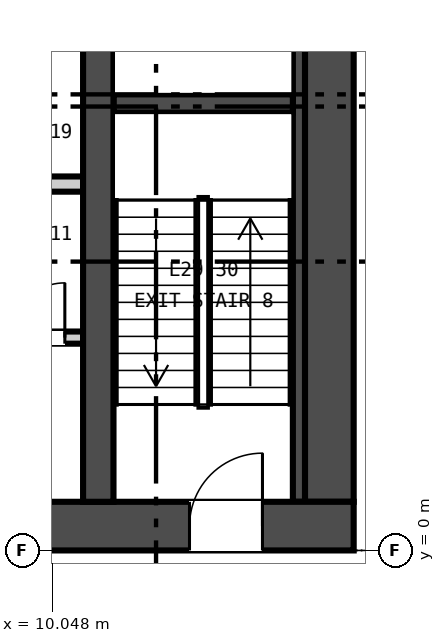
"""IFC4 building model, lengths in metres.
Left out: names, types, materials, properties, quantities, classifications, styles, units other than length and angle.
Written with IfcOpenShell. Run it as: python <this file> out.ifc"""

import sys

from ifc_helpers import new_model, si_unit, direction, frame, frame_2d, origin, place, context, subcontext, project, spatial, rectangle, extrude, element, fill, save


model = new_model("IFC4")
c1 = context("Model", 3, precision=1e-05, world=origin(), true_north=direction((0.0, 1.0)))
c2 = subcontext(c1, "Body", "Model", "MODEL_VIEW")
j1 = project(units=[si_unit("LENGTHUNIT", "METRE"), si_unit("PLANEANGLEUNIT", "RADIAN")], contexts=[c1])
p1 = place(None, origin())
s1 = spatial("IfcSite", under=j1, at=p1, CompositionType="ELEMENT")
p2 = place(p1, origin())
s2 = spatial("IfcBuilding", under=s1, at=p2, CompositionType="ELEMENT")
p3 = place(p2, frame((0.0, 0.0, 121.65)))
s3 = spatial("IfcBuildingStorey", under=s2, at=p3, CompositionType="ELEMENT", Elevation=121.65)
p4 = place(p3, frame((-15.0, 0.4, -0.3), z_axis=(0.0, 0.0, 1.0), x_axis=(1.0, 0.0, 0.0)))
e1 = element("IfcWall", 1, at=p4, inside=s3, PredefinedType="SOLIDWALL", context=c2, shape_type="SweptSolid", body=[
    extrude(rectangle(XDim=30.0, YDim=0.8, at=frame_2d((15.0, 0.0))), origin(), (0.0, 0.0, 1.0), 4.65),
])
p5 = place(p4, frame((5.8, 0.0, 0.3)))
e2 = element("IfcOpeningElement", 2, at=p5, cuts=e1, PredefinedType="OPENING", context=c2, shape_type="SweptSolid", body=[
    extrude(rectangle(XDim=2.4, YDim=2.4, at=frame_2d((1.2, 1.2))), frame((0.0, 0.41, 0.0), z_axis=(0.0, -1.0, 0.0), x_axis=(1.0, 0.0, 0.0)), (0.0, 0.0, 1.0), 0.82),
])
p6 = place(p4, frame((13.8, 0.0, 0.3)))
e3 = element("IfcOpeningElement", 3, at=p6, cuts=e1, PredefinedType="OPENING", context=c2, shape_type="SweptSolid", body=[
    extrude(rectangle(XDim=2.4, YDim=2.4, at=frame_2d((1.2, 1.2))), frame((0.0, 0.41, 0.0), z_axis=(0.0, -1.0, 0.0), x_axis=(1.0, 0.0, 0.0)), (0.0, 0.0, 1.0), 0.82),
])
p7 = place(p4, frame((21.8, 0.0, 0.3)))
e4 = element("IfcOpeningElement", 4, at=p7, cuts=e1, PredefinedType="OPENING", context=c2, shape_type="SweptSolid", body=[
    extrude(rectangle(XDim=2.4, YDim=2.4, at=frame_2d((1.2, 1.2))), frame((0.0, 0.41, 0.0), z_axis=(0.0, -1.0, 0.0), x_axis=(1.0, 0.0, 0.0)), (0.0, 0.0, 1.0), 0.82),
])
p8 = place(p4, frame((1.5, 0.0, 0.3)))
e5 = element("IfcOpeningElement", 5, at=p8, cuts=e1, PredefinedType="OPENING", context=c2, shape_type="SweptSolid", body=[
    extrude(rectangle(XDim=1.2, YDim=2.1, at=frame_2d((0.6, 1.05))), frame((0.0, 0.41, 0.0), z_axis=(0.0, -1.0, 0.0), x_axis=(1.0, 0.0, 0.0)), (0.0, 0.0, 1.0), 0.82),
])
p9 = place(p4, frame((27.3, 0.0, 0.3)))
e6 = element("IfcOpeningElement", 6, at=p9, cuts=e1, PredefinedType="OPENING", context=c2, shape_type="SweptSolid", body=[
    extrude(rectangle(XDim=1.2, YDim=2.1, at=frame_2d((0.6, 1.05))), frame((0.0, 0.41, 0.0), z_axis=(0.0, -1.0, 0.0), x_axis=(1.0, 0.0, 0.0)), (0.0, 0.0, 1.0), 0.82),
])
p10 = place(p3, frame((14.6, 0.8, -0.3), z_axis=(0.0, 0.0, 1.0), x_axis=(0.0, 1.0, 0.0)))
e7 = element("IfcWall", 7, at=p10, inside=s3, PredefinedType="SOLIDWALL", context=c2, shape_type="SweptSolid", body=[
    extrude(rectangle(XDim=13.4, YDim=0.8, at=frame_2d((6.7, 0.0))), origin(), (0.0, 0.0, 1.0), 4.65),
])
p11 = place(p3, frame((10.8, 0.8, -0.3), z_axis=(0.0, 0.0, 1.0), x_axis=(0.0, 1.0, 0.0)))
e8 = element("IfcWall", 8, at=p11, inside=s3, PredefinedType="SOLIDWALL", context=c2, shape_type="SweptSolid", body=[
    extrude(rectangle(XDim=13.4, YDim=0.5, at=frame_2d((6.7, 0.0))), origin(), (0.0, 0.0, 1.0), 4.65),
])
p12 = place(p3, frame((-10.55, 3.5, 0.0), z_axis=(0.0, 0.0, 1.0), x_axis=(1.0, 0.0, 0.0)))
e9 = element("IfcWall", 9, at=p12, inside=s3, PredefinedType="PARTITIONING", context=c2, shape_type="SweptSolid", body=[
    extrude(rectangle(XDim=21.1, YDim=0.2, at=frame_2d((10.55, 0.0))), origin(), (0.0, 0.0, 1.0), 4.35),
])
p13 = place(p12, frame((0.675, 0.0, 0.0)))
e10 = element("IfcOpeningElement", 10, at=p13, cuts=e9, PredefinedType="OPENING", context=c2, shape_type="SweptSolid", body=[
    extrude(rectangle(XDim=1.2, YDim=2.1, at=frame_2d((0.6, 1.05))), frame((0.0, 0.11, 0.0), z_axis=(0.0, -1.0, 0.0), x_axis=(1.0, 0.0, 0.0)), (0.0, 0.0, 1.0), 0.22),
])
p14 = place(p12, frame((3.475, 0.0, 0.0)))
e11 = element("IfcOpeningElement", 11, at=p14, cuts=e9, PredefinedType="OPENING", context=c2, shape_type="SweptSolid", body=[
    extrude(rectangle(XDim=1.2, YDim=2.1, at=frame_2d((0.6, 1.05))), frame((0.0, 0.11, 0.0), z_axis=(0.0, -1.0, 0.0), x_axis=(1.0, 0.0, 0.0)), (0.0, 0.0, 1.0), 0.22),
])
p15 = place(p12, frame((6.275, 0.0, 0.0)))
e12 = element("IfcOpeningElement", 12, at=p15, cuts=e9, PredefinedType="OPENING", context=c2, shape_type="SweptSolid", body=[
    extrude(rectangle(XDim=1.2, YDim=2.1, at=frame_2d((0.6, 1.05))), frame((0.0, 0.11, 0.0), z_axis=(0.0, -1.0, 0.0), x_axis=(1.0, 0.0, 0.0)), (0.0, 0.0, 1.0), 0.22),
])
p16 = place(p12, frame((9.075, 0.0, 0.0)))
e13 = element("IfcOpeningElement", 13, at=p16, cuts=e9, PredefinedType="OPENING", context=c2, shape_type="SweptSolid", body=[
    extrude(rectangle(XDim=1.2, YDim=2.1, at=frame_2d((0.6, 1.05))), frame((0.0, 0.11, 0.0), z_axis=(0.0, -1.0, 0.0), x_axis=(1.0, 0.0, 0.0)), (0.0, 0.0, 1.0), 0.22),
])
p17 = place(p12, frame((11.875, 0.0, 0.0)))
e14 = element("IfcOpeningElement", 14, at=p17, cuts=e9, PredefinedType="OPENING", context=c2, shape_type="SweptSolid", body=[
    extrude(rectangle(XDim=1.2, YDim=2.1, at=frame_2d((0.6, 1.05))), frame((0.0, 0.11, 0.0), z_axis=(0.0, -1.0, 0.0), x_axis=(1.0, 0.0, 0.0)), (0.0, 0.0, 1.0), 0.22),
])
p18 = place(p12, frame((14.675, 0.0, 0.0)))
e15 = element("IfcOpeningElement", 15, at=p18, cuts=e9, PredefinedType="OPENING", context=c2, shape_type="SweptSolid", body=[
    extrude(rectangle(XDim=1.2, YDim=2.1, at=frame_2d((0.6, 1.05))), frame((0.0, 0.11, 0.0), z_axis=(0.0, -1.0, 0.0), x_axis=(1.0, 0.0, 0.0)), (0.0, 0.0, 1.0), 0.22),
])
p19 = place(p12, frame((17.475, 0.0, 0.0)))
e16 = element("IfcOpeningElement", 16, at=p19, cuts=e9, PredefinedType="OPENING", context=c2, shape_type="SweptSolid", body=[
    extrude(rectangle(XDim=1.2, YDim=2.1, at=frame_2d((0.6, 1.05))), frame((0.0, 0.11, 0.0), z_axis=(0.0, -1.0, 0.0), x_axis=(1.0, 0.0, 0.0)), (0.0, 0.0, 1.0), 0.22),
])
p20 = place(p12, frame((19.9, 0.0, 0.0)))
e17 = element("IfcOpeningElement", 17, at=p20, cuts=e9, PredefinedType="OPENING", context=c2, shape_type="SweptSolid", body=[
    extrude(rectangle(XDim=0.9, YDim=2.1, at=frame_2d((0.45, 1.05))), frame((0.0, 0.11, 0.0), z_axis=(0.0, -1.0, 0.0), x_axis=(1.0, 0.0, 0.0)), (0.0, 0.0, 1.0), 0.22),
])
p21 = place(p3, frame((-10.55, 6.025, 0.0), z_axis=(0.0, 0.0, 1.0), x_axis=(1.0, 0.0, 0.0)))
e18 = element("IfcWall", 18, at=p21, inside=s3, PredefinedType="PARTITIONING", context=c2, shape_type="SweptSolid", body=[
    extrude(rectangle(XDim=21.1, YDim=0.25, at=frame_2d((10.55, 0.0))), origin(), (0.0, 0.0, 1.0), 4.35),
])
p22 = place(p3, frame((11.05, 7.35, 0.0), z_axis=(0.0, 0.0, 1.0), x_axis=(1.0, 0.0, 0.0)))
e19 = element("IfcWall", 19, at=p22, inside=s3, PredefinedType="SOLIDWALL", context=c2, shape_type="SweptSolid", body=[
    extrude(rectangle(XDim=2.95, YDim=0.3, at=frame_2d((1.475, 0.0))), origin(), (0.0, 0.0, 1.0), 4.35),
])
p23 = place(p3, frame((14.1, 0.8, 0.0), z_axis=(0.0, 0.0, 1.0), x_axis=(0.0, 1.0, 0.0)))
e20 = element("IfcWall", 20, at=p23, inside=s3, PredefinedType="SOLIDWALL", context=c2, shape_type="SweptSolid", body=[
    extrude(rectangle(XDim=13.4, YDim=0.2, at=frame_2d((6.7, 0.0))), origin(), (0.0, 0.0, 1.0), 4.35),
])
p24 = place(p20, origin())
e21 = element("IfcDoor", 21, at=p24, inside=s3, OperationType="SINGLE_SWING_RIGHT", PredefinedType="DOOR", context=c2, shape_type="SweptSolid", body=[
    extrude(rectangle(XDim=0.9, YDim=2.1, at=frame_2d((0.45, 1.05))), frame((0.0, 0.025, 0.0), z_axis=(0.0, -1.0, 0.0), x_axis=(1.0, 0.0, 0.0)), (0.0, 0.0, 1.0), 0.05),
])
fill(e17, e21)
p25 = place(p9, origin())
e22 = element("IfcDoor", 22, at=p25, inside=s3, OperationType="SINGLE_SWING_RIGHT", PredefinedType="DOOR", context=c2, shape_type="SweptSolid", body=[
    extrude(rectangle(XDim=1.2, YDim=2.1, at=frame_2d((0.6, 1.05))), frame((0.0, 0.025, 0.0), z_axis=(0.0, -1.0, 0.0), x_axis=(1.0, 0.0, 0.0)), (0.0, 0.0, 1.0), 0.05),
])
fill(e6, e22)
save(model, sys.argv[1])
